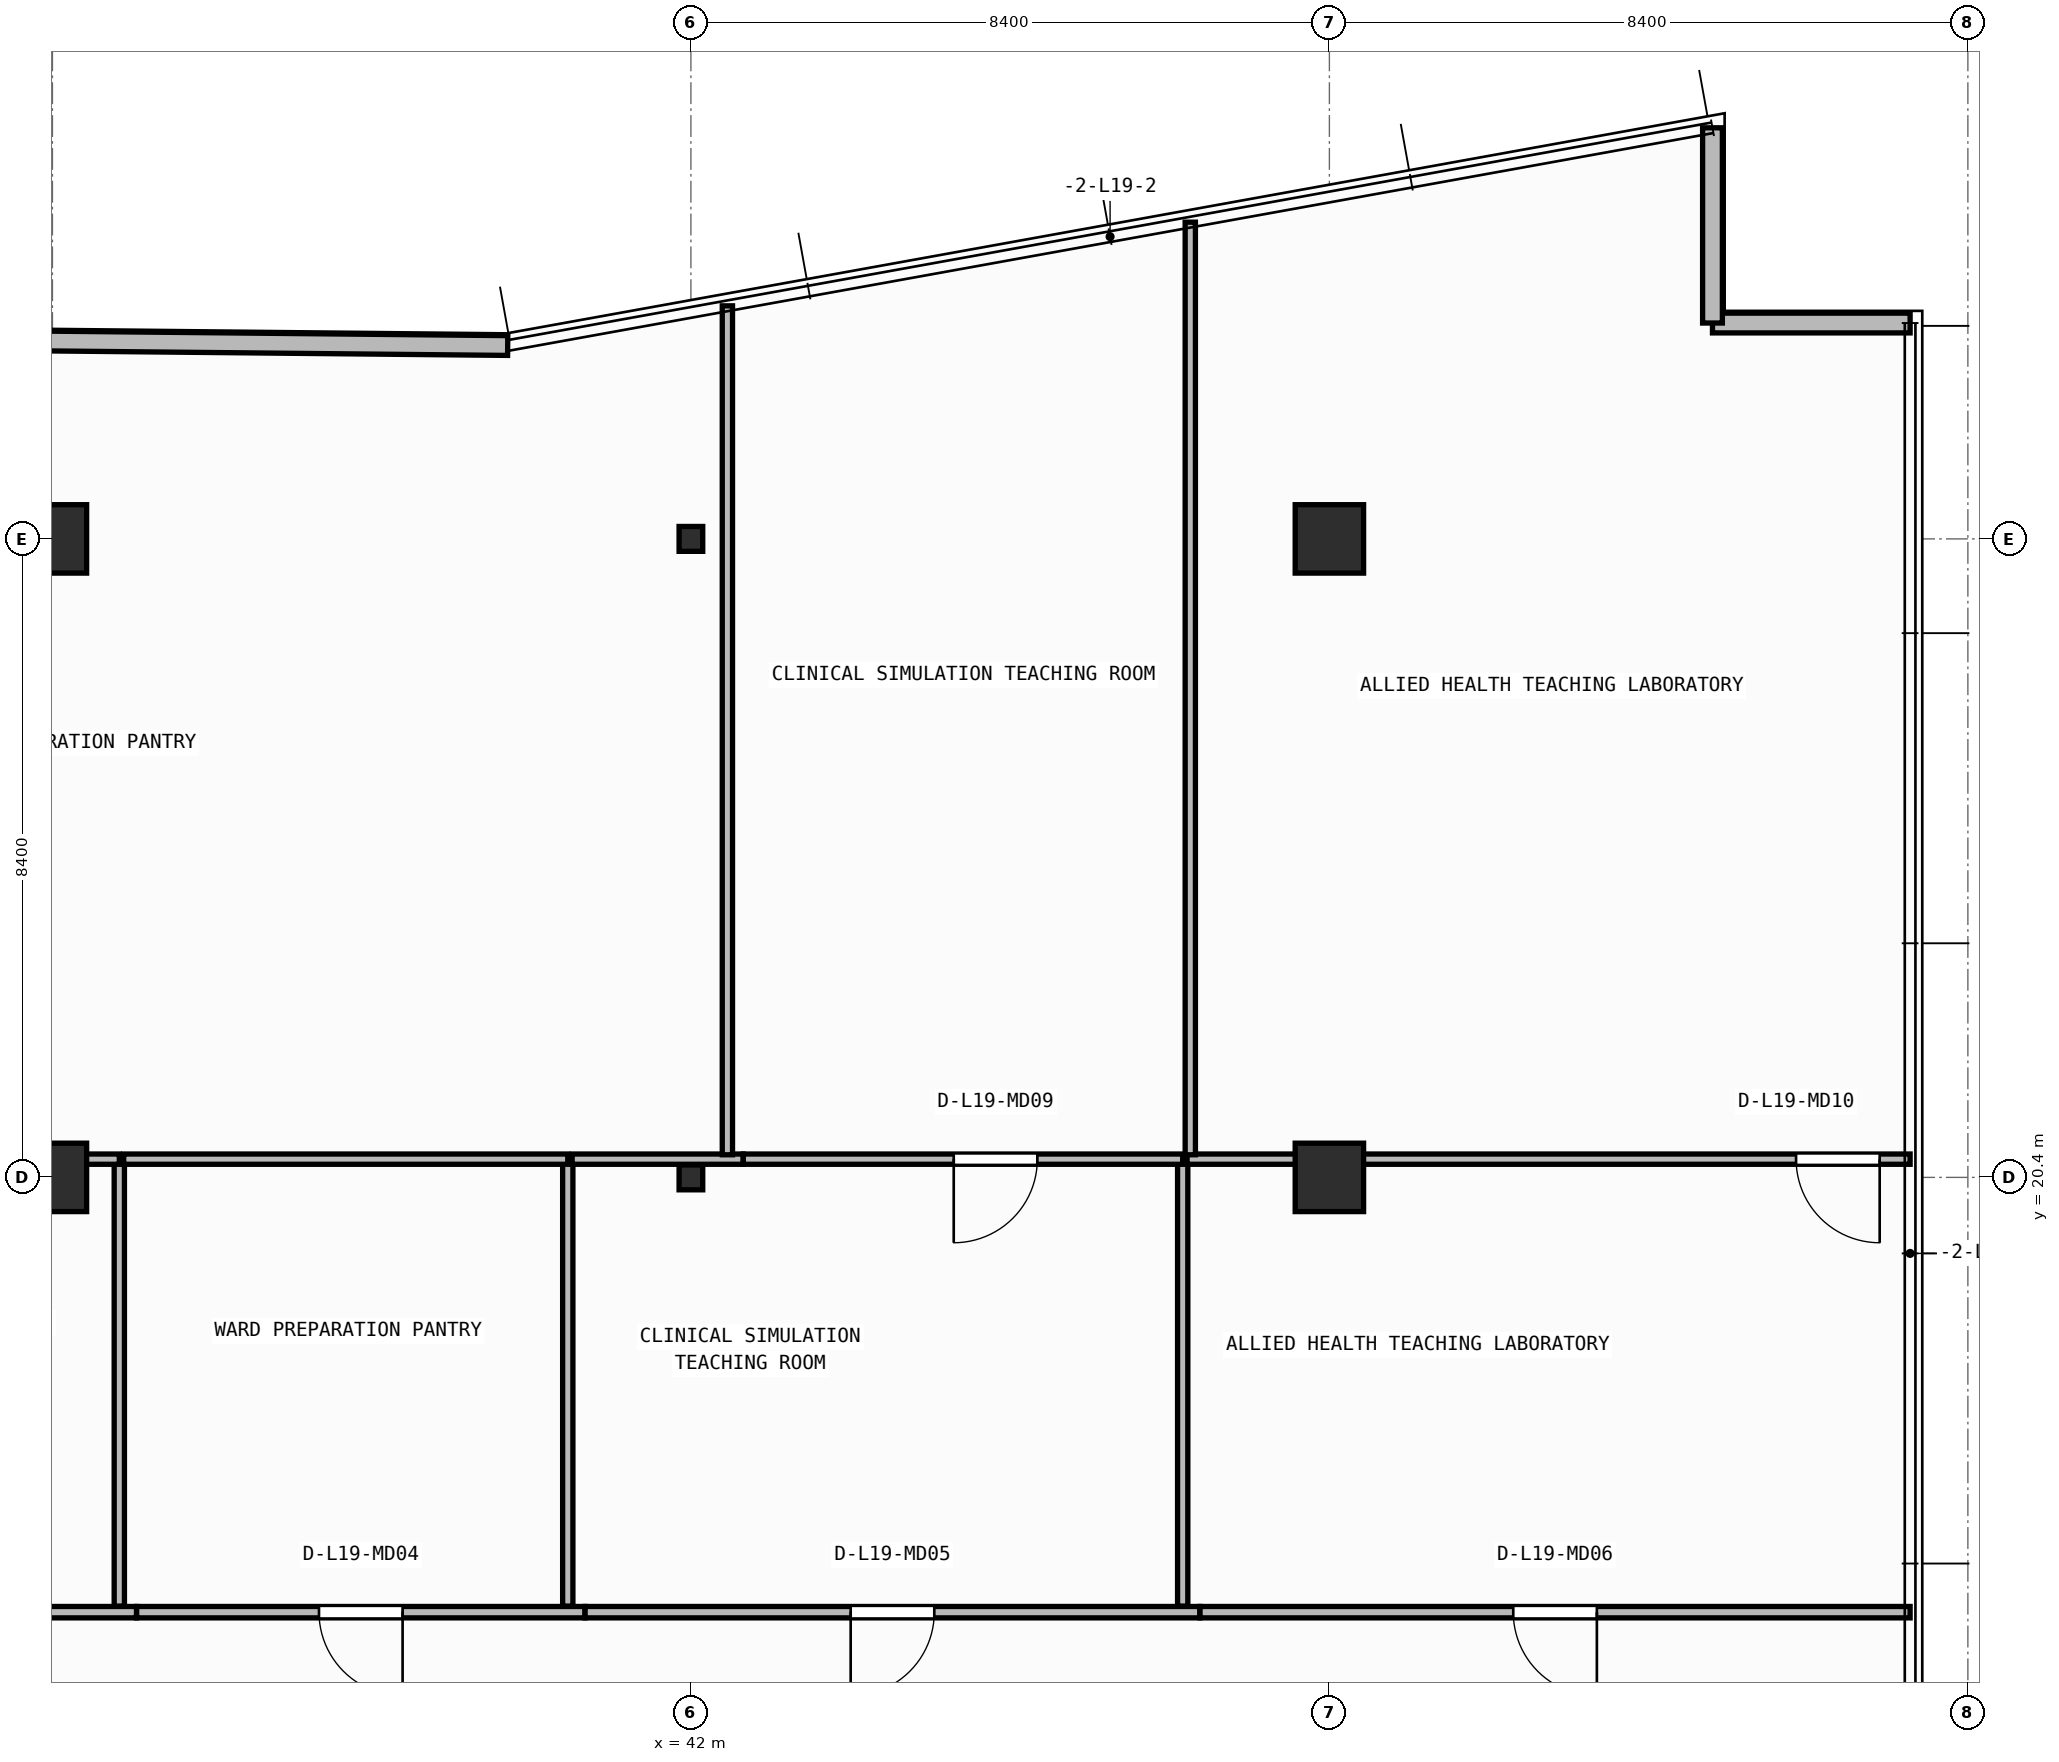
"""IFC4 building model, lengths in metres.
Left out: names, types, materials, properties, quantities, classifications, styles, units other than length and angle.
Written with IfcOpenShell. Run it as: python <this file> out.ifc"""

import sys

from ifc_helpers import new_model, si_unit, direction, frame, frame_2d, origin, origin_2d, place, context, subcontext, project, spatial, rectangle, i_section, extrude, element, fill, save


model = new_model("IFC4")
c1 = context("Model", 3, precision=1e-05, world=origin(), true_north=direction((0.0, 1.0)))
c2 = subcontext(c1, "Body", "Model", "MODEL_VIEW")
j1 = project(units=[si_unit("LENGTHUNIT", "METRE"), si_unit("PLANEANGLEUNIT", "RADIAN")], contexts=[c1])
p1 = place(None, origin())
s1 = spatial("IfcSite", under=j1, at=p1, CompositionType="ELEMENT")
p2 = place(p1, origin())
s2 = spatial("IfcBuilding", under=s1, at=p2, CompositionType="ELEMENT")
p3 = place(p2, frame((0.0, 0.0, 77.8)))
s3 = spatial("IfcBuildingStorey", under=s2, at=p3, CompositionType="ELEMENT", Elevation=77.8)
p4 = place(p3, frame((33.6, 20.4, 0.0), z_axis=(0.0, 0.0, 1.0), x_axis=(1.0, 0.0, 0.0)))
e1 = element("IfcColumn", 1, at=p4, inside=s3, PredefinedType="COLUMN", context=c2, shape_type="SweptSolid", body=[
    extrude(rectangle(XDim=0.9, YDim=0.9, at=origin_2d()), origin(), (0.0, 0.0, 1.0), 3.95),
])
p5 = place(p3, frame((42.0, 20.4, 0.0), z_axis=(0.0, 0.0, 1.0), x_axis=(1.0, 0.0, 0.0)))
e2 = element("IfcColumn", 2, at=p5, inside=s3, PredefinedType="COLUMN", context=c2, shape_type="SweptSolid", body=[
    extrude(i_section(OverallWidth=0.311, OverallDepth=0.327, WebThickness=0.016, FlangeThickness=0.025, FilletRadius=0.017, at=origin_2d()), origin(), (0.0, 0.0, 1.0), 3.95),
])
for number, where, z_axis, x_axis in (
    (3, (50.4, 20.4, 0.0), (0.0, 0.0, 1.0), (1.0, 0.0, 0.0)),
    (4, (33.6, 28.8, 0.0), (0.0, 0.0, 1.0), (1.0, 0.0, 0.0)),
):
    element("IfcColumn", number, at=place(p3, frame(where, z_axis=z_axis, x_axis=x_axis)), inside=s3, PredefinedType="COLUMN", context=c2, shape_type="SweptSolid", body=[
        extrude(rectangle(XDim=0.9, YDim=0.9, at=origin_2d()), origin(), (0.0, 0.0, 1.0), 3.95),
    ])
p6 = place(p3, frame((42.0, 28.8, 0.0), z_axis=(0.0, 0.0, 1.0), x_axis=(1.0, 0.0, 0.0)))
e5 = element("IfcColumn", 5, at=p6, inside=s3, PredefinedType="COLUMN", context=c2, shape_type="SweptSolid", body=[
    extrude(i_section(OverallWidth=0.311, OverallDepth=0.327, WebThickness=0.016, FlangeThickness=0.025, FilletRadius=0.017, at=origin_2d()), origin(), (0.0, 0.0, 1.0), 3.95),
])
p7 = place(p3, frame((50.4, 28.8, 0.0), z_axis=(0.0, 0.0, 1.0), x_axis=(1.0, 0.0, 0.0)))
e6 = element("IfcColumn", 6, at=p7, inside=s3, PredefinedType="COLUMN", context=c2, shape_type="SweptSolid", body=[
    extrude(rectangle(XDim=0.9, YDim=0.9, at=origin_2d()), origin(), (0.0, 0.0, 1.0), 3.95),
])
p8 = place(p3, frame((58.04, 31.64, 0.0), z_axis=(0.0, 0.0, 1.0), x_axis=(-1.0, 0.0, 0.0)))
e7 = element("IfcWall", 7, at=p8, inside=s3, PredefinedType="STANDARD", context=c2, shape_type="SweptSolid", body=[
    extrude(rectangle(XDim=2.6, YDim=0.26, at=frame_2d((1.3, 0.0))), origin(), (0.0, 0.0, 1.0), 3.71),
])
p9 = place(p3, frame((55.44, 31.64, 0.0), z_axis=(0.0, 0.0, 1.0), x_axis=(0.0, 1.0, 0.0)))
e8 = element("IfcWall", 8, at=p9, inside=s3, PredefinedType="STANDARD", context=c2, shape_type="SweptSolid", body=[
    extrude(rectangle(XDim=2.569, YDim=0.26, at=frame_2d((1.284, 0.0))), origin(), (0.0, 0.0, 1.0), 3.71),
])
p10 = place(p3, frame((39.59, 31.344, 0.0), z_axis=(0.0, 0.0, 1.0), x_axis=(-0.999952362926, 0.009760731435, 0.0)))
e9 = element("IfcWall", 9, at=p10, inside=s3, PredefinedType="STANDARD", context=c2, shape_type="SweptSolid", body=[
    extrude(rectangle(XDim=15.183, YDim=0.26, at=frame_2d((7.591, 0.0))), origin(), (0.0, 0.0, 1.0), 3.71),
])
p11 = place(p10, frame((6.391, 0.0, 0.9)))
e10 = element("IfcOpeningElement", 10, at=p11, cuts=e9, PredefinedType="OPENING", context=c2, shape_type="SweptSolid", body=[
    extrude(rectangle(XDim=2.4, YDim=1.65, at=frame_2d((1.2, 0.825))), frame((0.0, 0.14, 0.0), z_axis=(0.0, -1.0, 0.0), x_axis=(1.0, 0.0, 0.0)), (0.0, 0.0, 1.0), 0.28),
])
p12 = place(p3, frame((34.706, 14.68, 0.0), z_axis=(0.0, 0.0, 1.0), x_axis=(-1.0, 0.0, 0.0)))
e11 = element("IfcWall", 11, at=p12, inside=s3, PredefinedType="PARTITIONING", context=c2, shape_type="SweptSolid", body=[
    extrude(rectangle(XDim=4.952, YDim=0.15, at=frame_2d((2.476, 0.0))), origin(), (0.0, 0.0, 1.0), 3.71),
])
p13 = place(p12, frame((1.926, 0.0, 0.0)))
e12 = element("IfcOpeningElement", 12, at=p13, cuts=e11, PredefinedType="OPENING", context=c2, shape_type="SweptSolid", body=[
    extrude(rectangle(XDim=1.1, YDim=2.1, at=frame_2d((0.55, 1.05))), frame((0.0, 0.085, 0.0), z_axis=(0.0, -1.0, 0.0), x_axis=(1.0, 0.0, 0.0)), (0.0, 0.0, 1.0), 0.17),
])
p14 = place(p3, frame((40.606, 14.68, 0.0), z_axis=(0.0, 0.0, 1.0), x_axis=(-1.0, 0.0, 0.0)))
e13 = element("IfcWall", 13, at=p14, inside=s3, PredefinedType="PARTITIONING", context=c2, shape_type="SweptSolid", body=[
    extrude(rectangle(XDim=5.898, YDim=0.15, at=frame_2d((2.949, 0.0))), origin(), (0.0, 0.0, 1.0), 3.71),
])
p15 = place(p14, frame((2.399, 0.0, 0.0)))
e14 = element("IfcOpeningElement", 14, at=p15, cuts=e13, PredefinedType="OPENING", context=c2, shape_type="SweptSolid", body=[
    extrude(rectangle(XDim=1.1, YDim=2.1, at=frame_2d((0.55, 1.05))), frame((0.0, 0.085, 0.0), z_axis=(0.0, -1.0, 0.0), x_axis=(1.0, 0.0, 0.0)), (0.0, 0.0, 1.0), 0.17),
])
p16 = place(p3, frame((48.696, 14.68, 0.0), z_axis=(0.0, 0.0, 1.0), x_axis=(-1.0, 0.0, 0.0)))
e15 = element("IfcWall", 15, at=p16, inside=s3, PredefinedType="PARTITIONING", context=c2, shape_type="SweptSolid", body=[
    extrude(rectangle(XDim=8.088, YDim=0.15, at=frame_2d((4.044, 0.0))), origin(), (0.0, 0.0, 1.0), 3.71),
])
p17 = place(p16, frame((3.494, 0.0, 0.0)))
e16 = element("IfcOpeningElement", 16, at=p17, cuts=e15, PredefinedType="OPENING", context=c2, shape_type="SweptSolid", body=[
    extrude(rectangle(XDim=1.1, YDim=2.1, at=frame_2d((0.55, 1.05))), frame((0.0, 0.085, 0.0), z_axis=(0.0, -1.0, 0.0), x_axis=(1.0, 0.0, 0.0)), (0.0, 0.0, 1.0), 0.17),
])
p18 = place(p3, frame((58.04, 14.68, 0.0), z_axis=(0.0, 0.0, 1.0), x_axis=(-1.0, 0.0, 0.0)))
e17 = element("IfcWall", 17, at=p18, inside=s3, PredefinedType="PARTITIONING", context=c2, shape_type="SweptSolid", body=[
    extrude(rectangle(XDim=9.342, YDim=0.15, at=frame_2d((4.671, 0.0))), origin(), (0.0, 0.0, 1.0), 3.71),
])
p19 = place(p18, frame((4.121, 0.0, 0.0)))
e18 = element("IfcOpeningElement", 18, at=p19, cuts=e17, PredefinedType="OPENING", context=c2, shape_type="SweptSolid", body=[
    extrude(rectangle(XDim=1.1, YDim=2.1, at=frame_2d((0.55, 1.05))), frame((0.0, 0.085, 0.0), z_axis=(0.0, -1.0, 0.0), x_axis=(1.0, 0.0, 0.0)), (0.0, 0.0, 1.0), 0.17),
])
p20 = place(p3, frame((34.48, 14.76, 0.0), z_axis=(0.0, 0.0, 1.0), x_axis=(0.0, 1.0, 0.0)))
e19 = element("IfcWall", 19, at=p20, inside=s3, PredefinedType="PARTITIONING", context=c2, shape_type="SweptSolid", body=[
    extrude(rectangle(XDim=5.88, YDim=0.135, at=frame_2d((2.94, 0.0))), origin(), (0.0, 0.0, 1.0), 3.71),
])
p21 = place(p3, frame((34.48, 20.64, 0.0), z_axis=(0.0, 0.0, 1.0), x_axis=(-1.0, 0.0, 0.0)))
e20 = element("IfcWall", 20, at=p21, inside=s3, PredefinedType="PARTITIONING", context=c2, shape_type="SweptSolid", body=[
    extrude(rectangle(XDim=4.515, YDim=0.135, at=frame_2d((2.257, 0.0))), origin(), (0.0, 0.0, 1.0), 3.073),
])
p22 = place(p3, frame((40.38, 14.76, 0.0), z_axis=(0.0, 0.0, 1.0), x_axis=(0.0, 1.0, 0.0)))
e21 = element("IfcWall", 21, at=p22, inside=s3, PredefinedType="PARTITIONING", context=c2, shape_type="SweptSolid", body=[
    extrude(rectangle(XDim=5.88, YDim=0.135, at=frame_2d((2.94, 0.0))), origin(), (0.0, 0.0, 1.0), 3.71),
])
p23 = place(p3, frame((40.38, 20.64, 0.0), z_axis=(0.0, 0.0, 1.0), x_axis=(-1.0, 0.0, 0.0)))
e22 = element("IfcWall", 22, at=p23, inside=s3, PredefinedType="PARTITIONING", context=c2, shape_type="SweptSolid", body=[
    extrude(rectangle(XDim=5.842, YDim=0.135, at=frame_2d((2.921, 0.0))), origin(), (0.0, 0.0, 1.0), 3.073),
])
p24 = place(p3, frame((48.47, 14.76, 0.0), z_axis=(0.0, 0.0, 1.0), x_axis=(0.0, 1.0, 0.0)))
e23 = element("IfcWall", 23, at=p24, inside=s3, PredefinedType="PARTITIONING", context=c2, shape_type="SweptSolid", body=[
    extrude(rectangle(XDim=5.88, YDim=0.135, at=frame_2d((2.94, 0.0))), origin(), (0.0, 0.0, 1.0), 3.71),
])
p25 = place(p3, frame((42.688, 20.64, 0.0), z_axis=(0.0, 0.0, 1.0), x_axis=(-1.0, 0.0, 0.0)))
e24 = element("IfcWall", 24, at=p25, inside=s3, PredefinedType="PARTITIONING", context=c2, shape_type="SweptSolid", body=[
    extrude(rectangle(XDim=2.25, YDim=0.135, at=frame_2d((1.125, 0.0))), origin(), (0.0, 0.0, 1.0), 3.073),
])
p26 = place(p3, frame((48.47, 20.64, 0.0), z_axis=(0.0, 0.0, 1.0), x_axis=(-1.0, 0.0, 0.0)))
e25 = element("IfcWall", 25, at=p26, inside=s3, PredefinedType="PARTITIONING", context=c2, shape_type="SweptSolid", body=[
    extrude(rectangle(XDim=5.781, YDim=0.135, at=frame_2d((2.89, 0.0))), origin(), (0.0, 0.0, 1.0), 3.073),
])
p27 = place(p26, frame((1.912, 0.0, 0.0)))
e26 = element("IfcOpeningElement", 26, at=p27, cuts=e25, PredefinedType="OPENING", context=c2, shape_type="SweptSolid", body=[
    extrude(rectangle(XDim=1.1, YDim=2.1, at=frame_2d((0.55, 1.05))), frame((0.0, 0.077, 0.0), z_axis=(0.0, -1.0, 0.0), x_axis=(1.0, 0.0, 0.0)), (0.0, 0.0, 1.0), 0.155),
])
p28 = place(p3, frame((58.04, 20.64, 0.0), z_axis=(0.0, 0.0, 1.0), x_axis=(-1.0, 0.0, 0.0)))
e27 = element("IfcWall", 27, at=p28, inside=s3, PredefinedType="PARTITIONING", context=c2, shape_type="SweptSolid", body=[
    extrude(rectangle(XDim=9.512, YDim=0.135, at=frame_2d((4.756, 0.0))), origin(), (0.0, 0.0, 1.0), 3.073),
])
p29 = place(p28, frame((0.4, 0.0, 0.0)))
e28 = element("IfcOpeningElement", 28, at=p29, cuts=e27, PredefinedType="OPENING", context=c2, shape_type="SweptSolid", body=[
    extrude(rectangle(XDim=1.1, YDim=2.1, at=frame_2d((0.55, 1.05))), frame((0.0, 0.077, 0.0), z_axis=(0.0, -1.0, 0.0), x_axis=(1.0, 0.0, 0.0)), (0.0, 0.0, 1.0), 0.155),
])
p30 = place(p3, frame((42.48, 20.698, 0.0), z_axis=(0.0, 0.0, 1.0), x_axis=(0.0, 1.0, 0.0)))
e29 = element("IfcWall", 29, at=p30, inside=s3, PredefinedType="PARTITIONING", context=c2, shape_type="SweptSolid", body=[
    extrude(rectangle(XDim=11.169, YDim=0.135, at=frame_2d((5.584, 0.0))), origin(), (0.0, 0.0, 1.0), 3.073),
])
p31 = place(p3, frame((48.57, 20.698, 0.0), z_axis=(0.0, 0.0, 1.0), x_axis=(0.0, 1.0, 0.0)))
e30 = element("IfcWall", 30, at=p31, inside=s3, PredefinedType="PARTITIONING", context=c2, shape_type="SweptSolid", body=[
    extrude(rectangle(XDim=12.269, YDim=0.135, at=frame_2d((6.135, 0.0))), origin(), (0.0, 0.0, 1.0), 3.71),
])
p32 = place(p15, origin())
e31 = element("IfcDoor", 31, at=p32, inside=s3, OperationType="SINGLE_SWING_LEFT", PredefinedType="DOOR", context=c2, shape_type="SweptSolid", body=[
    extrude(rectangle(XDim=1.1, YDim=2.1, at=frame_2d((0.55, 1.05))), frame((0.0, 0.025, 0.0), z_axis=(0.0, -1.0, 0.0), x_axis=(1.0, 0.0, 0.0)), (0.0, 0.0, 1.0), 0.05),
])
fill(e14, e31)
p33 = place(p17, origin())
e32 = element("IfcDoor", 32, at=p33, inside=s3, OperationType="SINGLE_SWING_RIGHT", PredefinedType="DOOR", context=c2, shape_type="SweptSolid", body=[
    extrude(rectangle(XDim=1.1, YDim=2.1, at=frame_2d((0.55, 1.05))), frame((0.0, 0.025, 0.0), z_axis=(0.0, -1.0, 0.0), x_axis=(1.0, 0.0, 0.0)), (0.0, 0.0, 1.0), 0.05),
])
fill(e16, e32)
p34 = place(p19, origin())
e33 = element("IfcDoor", 33, at=p34, inside=s3, OperationType="SINGLE_SWING_LEFT", PredefinedType="DOOR", context=c2, shape_type="SweptSolid", body=[
    extrude(rectangle(XDim=1.1, YDim=2.1, at=frame_2d((0.55, 1.05))), frame((0.0, 0.025, 0.0), z_axis=(0.0, -1.0, 0.0), x_axis=(1.0, 0.0, 0.0)), (0.0, 0.0, 1.0), 0.05),
])
fill(e18, e33)
p35 = place(p27, origin())
e34 = element("IfcDoor", 34, at=p35, inside=s3, OperationType="SINGLE_SWING_RIGHT", PredefinedType="DOOR", context=c2, shape_type="SweptSolid", body=[
    extrude(rectangle(XDim=1.1, YDim=2.1, at=frame_2d((0.55, 1.05))), frame((0.0, 0.025, 0.0), z_axis=(0.0, -1.0, 0.0), x_axis=(1.0, 0.0, 0.0)), (0.0, 0.0, 1.0), 0.05),
])
fill(e26, e34)
p36 = place(p29, origin())
e35 = element("IfcDoor", 35, at=p36, inside=s3, OperationType="SINGLE_SWING_LEFT", PredefinedType="DOOR", context=c2, shape_type="SweptSolid", body=[
    extrude(rectangle(XDim=1.1, YDim=2.1, at=frame_2d((0.55, 1.05))), frame((0.0, 0.025, 0.0), z_axis=(0.0, -1.0, 0.0), x_axis=(1.0, 0.0, 0.0)), (0.0, 0.0, 1.0), 0.05),
])
fill(e28, e35)
save(model, sys.argv[1])
